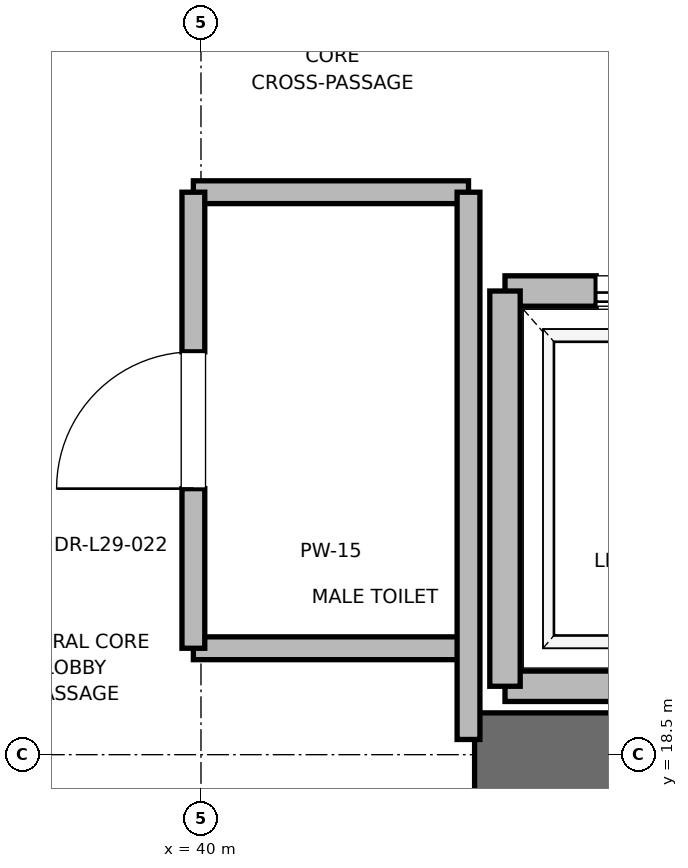
"""IFC4 building model, lengths in metres.
Left out: names, types, materials, properties, quantities, classifications, styles, units other than length and angle.
Written with IfcOpenShell. Run it as: python <this file> out.ifc"""

import sys

from ifc_helpers import new_model, si_unit, direction, frame, frame_2d, origin, place, context, subcontext, project, spatial, rectangle, extrude, element, fill, save


model = new_model("IFC4")
c1 = context("Model", 3, precision=1e-05, world=origin(), true_north=direction((0.0, 1.0)))
c2 = subcontext(c1, "Body", "Model", "MODEL_VIEW")
j1 = project(units=[si_unit("LENGTHUNIT", "METRE"), si_unit("PLANEANGLEUNIT", "RADIAN")], contexts=[c1])
p1 = place(None, origin())
s1 = spatial("IfcSite", under=j1, at=p1, CompositionType="ELEMENT")
p2 = place(p1, origin())
s2 = spatial("IfcBuilding", under=s1, at=p2, CompositionType="ELEMENT")
p3 = place(p2, frame((0.0, 0.0, 128.4)))
s3 = spatial("IfcBuildingStorey", under=s2, at=p3, CompositionType="ELEMENT", Elevation=128.4)
p4 = place(p3, frame((41.8, 18.5, 0.0), z_axis=(0.0, 0.0, 1.0), x_axis=(1.0, 0.0, 0.0)))
e1 = element("IfcWall", 1, at=p4, inside=s3, PredefinedType="SHEAR", context=c2, shape_type="SweptSolid", body=[
    extrude(rectangle(XDim=9.2, YDim=0.55, at=frame_2d((4.6, 0.0))), origin(), (0.0, 0.0, 1.0), 3.775),
])
p5 = place(p3, frame((42.0, 18.95, 0.0), z_axis=(0.0, 0.0, 1.0), x_axis=(1.0, 0.0, 0.0)))
e2 = element("IfcWall", 2, at=p5, inside=s3, PredefinedType="SOLIDWALL", context=c2, shape_type="SweptSolid", body=[
    extrude(rectangle(XDim=2.3, YDim=0.2, at=frame_2d((1.15, 0.0))), origin(), (0.0, 0.0, 1.0), 2.755),
])
p6 = place(p3, frame((44.3, 21.55, 0.0), z_axis=(0.0, 0.0, 1.0), x_axis=(-1.0, 0.0, 0.0)))
e3 = element("IfcWall", 3, at=p6, inside=s3, PredefinedType="SOLIDWALL", context=c2, shape_type="SweptSolid", body=[
    extrude(rectangle(XDim=2.3, YDim=0.2, at=frame_2d((1.15, 0.0))), origin(), (0.0, 0.0, 1.0), 3.775),
])
p7 = place(p6, frame((0.6, 0.0, 0.0)))
e4 = element("IfcOpeningElement", 4, at=p7, cuts=e3, PredefinedType="OPENING", context=c2, shape_type="SweptSolid", body=[
    extrude(rectangle(XDim=1.1, YDim=2.2, at=frame_2d((0.55, 1.1))), frame((0.0, 0.1, 0.0), z_axis=(0.0, -1.0, 0.0), x_axis=(1.0, 0.0, 0.0)), (0.0, 0.0, 1.0), 0.2),
])
p8 = place(p3, frame((42.0, 21.55, 0.0), z_axis=(0.0, 0.0, 1.0), x_axis=(0.0, -1.0, 0.0)))
e5 = element("IfcWall", 5, at=p8, inside=s3, PredefinedType="SOLIDWALL", context=c2, shape_type="SweptSolid", body=[
    extrude(rectangle(XDim=2.6, YDim=0.2, at=frame_2d((1.3, 0.0))), origin(), (0.0, 0.0, 1.0), 2.755),
])
for number, where, z_axis, x_axis in (
    (6, (39.95, 19.2, 0.0), (0.0, 0.0, 1.0), (1.0, 0.0, 0.0)),
    (7, (39.95, 22.2, 0.0), (0.0, 0.0, 1.0), (1.0, 0.0, 0.0)),
):
    element("IfcWall", number, at=place(p3, frame(where, z_axis=z_axis, x_axis=x_axis)), inside=s3, PredefinedType="PARTITIONING", context=c2, shape_type="SweptSolid", body=[
        extrude(rectangle(XDim=1.81, YDim=0.15, at=frame_2d((0.905, 0.0))), origin(), (0.0, 0.0, 1.0), 2.85),
    ])
p9 = place(p3, frame((41.76, 18.6, 0.0), z_axis=(0.0, 0.0, 1.0), x_axis=(0.0, 1.0, 0.0)))
e8 = element("IfcWall", 8, at=p9, inside=s3, PredefinedType="PARTITIONING", context=c2, shape_type="SweptSolid", body=[
    extrude(rectangle(XDim=3.6, YDim=0.15, at=frame_2d((1.8, 0.0))), origin(), (0.0, 0.0, 1.0), 2.755),
])
p10 = place(p3, frame((39.95, 19.2, 0.0), z_axis=(0.0, 0.0, 1.0), x_axis=(0.0, 1.0, 0.0)))
e9 = element("IfcWall", 9, at=p10, inside=s3, PredefinedType="PARTITIONING", context=c2, shape_type="SweptSolid", body=[
    extrude(rectangle(XDim=3.0, YDim=0.15, at=frame_2d((1.5, 0.0))), origin(), (0.0, 0.0, 1.0), 2.85),
])
p11 = place(p10, frame((1.05, 0.0, 0.0)))
e10 = element("IfcOpeningElement", 10, at=p11, cuts=e9, PredefinedType="OPENING", context=c2, shape_type="SweptSolid", body=[
    extrude(rectangle(XDim=0.9, YDim=2.1, at=frame_2d((0.45, 1.05))), frame((0.0, 0.075, 0.0), z_axis=(0.0, -1.0, 0.0), x_axis=(1.0, 0.0, 0.0)), (0.0, 0.0, 1.0), 0.15),
])
p12 = place(p7, origin())
e11 = element("IfcDoor", 11, at=p12, inside=s3, OperationType="SLIDING_TO_RIGHT", PredefinedType="DOOR", context=c2, shape_type="SweptSolid", body=[
    extrude(rectangle(XDim=1.1, YDim=2.2, at=frame_2d((0.55, 1.1))), frame((0.0, 0.025, 0.0), z_axis=(0.0, -1.0, 0.0), x_axis=(1.0, 0.0, 0.0)), (0.0, 0.0, 1.0), 0.05),
])
fill(e4, e11)
p13 = place(p11, origin())
e12 = element("IfcDoor", 12, at=p13, inside=s3, OperationType="SINGLE_SWING_LEFT", PredefinedType="DOOR", context=c2, shape_type="SweptSolid", body=[
    extrude(rectangle(XDim=0.9, YDim=2.1, at=frame_2d((0.45, 1.05))), frame((0.0, 0.025, 0.0), z_axis=(0.0, -1.0, 0.0), x_axis=(1.0, 0.0, 0.0)), (0.0, 0.0, 1.0), 0.05),
])
fill(e10, e12)
save(model, sys.argv[1])
